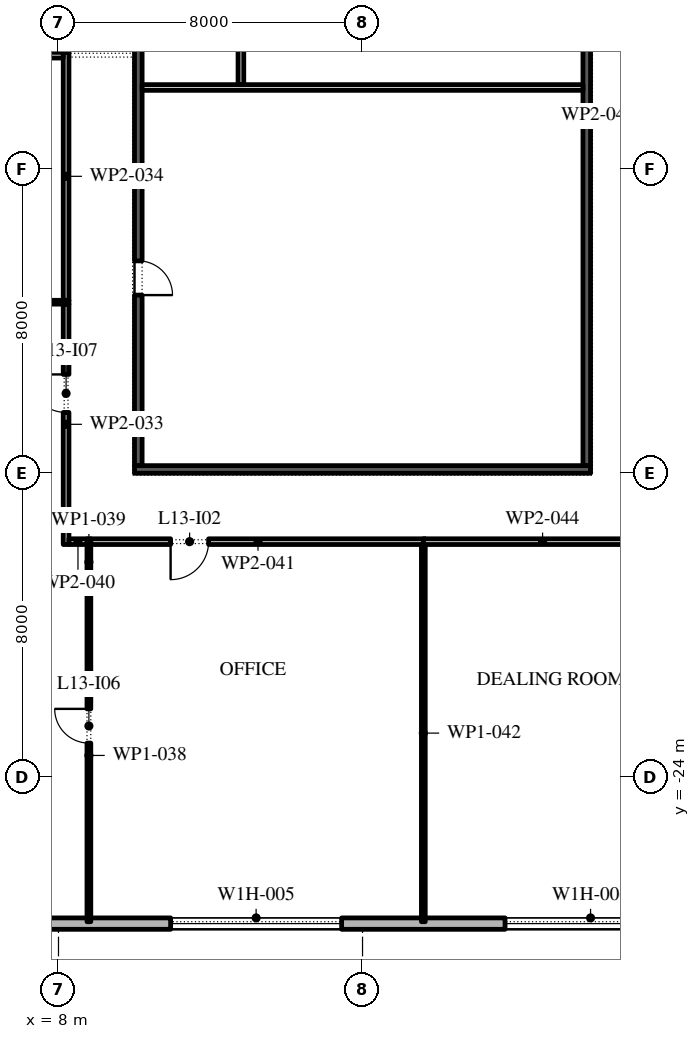
"""IFC4 building model, lengths in metres.
Left out: names, types, materials, properties, quantities, classifications, styles, units other than length and angle.
Written with IfcOpenShell. Run it as: python <this file> out.ifc"""

import sys

from ifc_helpers import new_model, si_unit, direction, frame, frame_2d, origin, place, context, subcontext, project, spatial, rectangle, extrude, element, fill, save


model = new_model("IFC4")
c1 = context("Model", 3, precision=1e-05, world=origin(), true_north=direction((0.0, 1.0)))
c2 = subcontext(c1, "Body", "Model", "MODEL_VIEW")
j1 = project(units=[si_unit("LENGTHUNIT", "METRE"), si_unit("PLANEANGLEUNIT", "RADIAN")], contexts=[c1])
p1 = place(None, origin())
s1 = spatial("IfcSite", under=j1, at=p1, CompositionType="ELEMENT")
p2 = place(p1, origin())
s2 = spatial("IfcBuilding", under=s1, at=p2, CompositionType="ELEMENT")
p3 = place(p2, frame((0.0, 0.0, 64.8)))
s3 = spatial("IfcBuildingStorey", under=s2, at=p3, CompositionType="ELEMENT", Elevation=64.8)
p4 = place(p3, frame((-26.1, -27.85, 0.0), z_axis=(0.0, 0.0, 1.0), x_axis=(1.0, 0.0, 0.0)))
e1 = element("IfcWall", 1, at=p4, inside=s3, PredefinedType="STANDARD", context=c2, shape_type="SweptSolid", body=[
    extrude(rectangle(XDim=52.5, YDim=0.3, at=frame_2d((26.25, 0.0))), origin(), (0.0, 0.0, 1.0), 4.0),
])
p5 = place(p4, frame((2.0, 0.0, 0.45)))
e2 = element("IfcOpeningElement", 2, at=p5, cuts=e1, PredefinedType="OPENING", context=c2, shape_type="SweptSolid", body=[
    extrude(rectangle(XDim=4.5, YDim=2.75, at=frame_2d((2.25, 1.375))), frame((0.0, 0.16, 0.0), z_axis=(0.0, -1.0, 0.0), x_axis=(1.0, 0.0, 0.0)), (0.0, 0.0, 1.0), 0.32),
])
p6 = place(p4, frame((10.65, 0.0, 0.45)))
e3 = element("IfcOpeningElement", 3, at=p6, cuts=e1, PredefinedType="OPENING", context=c2, shape_type="SweptSolid", body=[
    extrude(rectangle(XDim=4.5, YDim=2.75, at=frame_2d((2.25, 1.375))), frame((0.0, 0.16, 0.0), z_axis=(0.0, -1.0, 0.0), x_axis=(1.0, 0.0, 0.0)), (0.0, 0.0, 1.0), 0.32),
])
p7 = place(p4, frame((20.5, 0.0, 0.0)))
e4 = element("IfcOpeningElement", 4, at=p7, cuts=e1, PredefinedType="OPENING", context=c2, shape_type="SweptSolid", body=[
    extrude(rectangle(XDim=2.4, YDim=3.5, at=frame_2d((1.2, 1.75))), frame((0.0, 0.16, 0.0), z_axis=(0.0, -1.0, 0.0), x_axis=(1.0, 0.0, 0.0)), (0.0, 0.0, 1.0), 0.32),
])
p8 = place(p4, frame((28.25, 0.0, 0.45)))
e5 = element("IfcOpeningElement", 5, at=p8, cuts=e1, PredefinedType="OPENING", context=c2, shape_type="SweptSolid", body=[
    extrude(rectangle(XDim=4.5, YDim=2.75, at=frame_2d((2.25, 1.375))), frame((0.0, 0.16, 0.0), z_axis=(0.0, -1.0, 0.0), x_axis=(1.0, 0.0, 0.0)), (0.0, 0.0, 1.0), 0.32),
])
p9 = place(p4, frame((37.05, 0.0, 0.45)))
e6 = element("IfcOpeningElement", 6, at=p9, cuts=e1, PredefinedType="OPENING", context=c2, shape_type="SweptSolid", body=[
    extrude(rectangle(XDim=4.5, YDim=2.75, at=frame_2d((2.25, 1.375))), frame((0.0, 0.16, 0.0), z_axis=(0.0, -1.0, 0.0), x_axis=(1.0, 0.0, 0.0)), (0.0, 0.0, 1.0), 0.32),
])
p10 = place(p4, frame((45.85, 0.0, 0.45)))
e7 = element("IfcOpeningElement", 7, at=p10, cuts=e1, PredefinedType="OPENING", context=c2, shape_type="SweptSolid", body=[
    extrude(rectangle(XDim=4.5, YDim=2.75, at=frame_2d((2.25, 1.375))), frame((0.0, 0.16, 0.0), z_axis=(0.0, -1.0, 0.0), x_axis=(1.0, 0.0, 0.0)), (0.0, 0.0, 1.0), 0.32),
])
p11 = place(p3, frame((21.9, -15.8, 0.0), z_axis=(0.0, 0.0, 1.0), x_axis=(0.0, 1.0, 0.0)))
e8 = element("IfcWall", 8, at=p11, inside=s3, PredefinedType="SHEAR", context=c2, shape_type="SweptSolid", body=[
    extrude(rectangle(XDim=13.05, YDim=0.2, at=frame_2d((6.525, 0.0))), origin(), (0.0, 0.0, 1.0), 4.0),
])
p12 = place(p11, frame((11.087, 0.0, 0.0)))
e9 = element("IfcOpeningElement", 9, at=p12, cuts=e8, PredefinedType="OPENING", context=c2, shape_type="SweptSolid", body=[
    extrude(rectangle(XDim=0.9, YDim=2.1, at=frame_2d((0.45, 1.05))), frame((0.0, 0.11, 0.0), z_axis=(0.0, -1.0, 0.0), x_axis=(1.0, 0.0, 0.0)), (0.0, 0.0, 1.0), 0.22),
])
p13 = place(p3, frame((10.1, -15.8, 0.0), z_axis=(0.0, 0.0, 1.0), x_axis=(0.0, 1.0, 0.0)))
e10 = element("IfcWall", 10, at=p13, inside=s3, PredefinedType="SHEAR", context=c2, shape_type="SweptSolid", body=[
    extrude(rectangle(XDim=13.05, YDim=0.2, at=frame_2d((6.525, 0.0))), origin(), (0.0, 0.0, 1.0), 4.0),
])
p14 = place(p13, frame((4.488, 0.0, 0.0)))
e11 = element("IfcOpeningElement", 11, at=p14, cuts=e10, PredefinedType="OPENING", context=c2, shape_type="SweptSolid", body=[
    extrude(rectangle(XDim=0.9, YDim=2.1, at=frame_2d((0.45, 1.05))), frame((0.0, 0.11, 0.0), z_axis=(0.0, -1.0, 0.0), x_axis=(1.0, 0.0, 0.0)), (0.0, 0.0, 1.0), 0.22),
])
p15 = place(p13, frame((11.038, 0.0, 0.0)))
e12 = element("IfcOpeningElement", 12, at=p15, cuts=e10, PredefinedType="OPENING", context=c2, shape_type="SweptSolid", body=[
    extrude(rectangle(XDim=1.0, YDim=2.1, at=frame_2d((0.5, 1.05))), frame((0.0, 0.11, 0.0), z_axis=(0.0, -1.0, 0.0), x_axis=(1.0, 0.0, 0.0)), (0.0, 0.0, 1.0), 0.22),
])
p16 = place(p3, frame((10.0, -15.9, 0.0), z_axis=(0.0, 0.0, 1.0), x_axis=(1.0, 0.0, 0.0)))
e13 = element("IfcWall", 13, at=p16, inside=s3, PredefinedType="SHEAR", context=c2, shape_type="SweptSolid", body=[
    extrude(rectangle(XDim=12.0, YDim=0.2, at=frame_2d((6.0, 0.0))), origin(), (0.0, 0.0, 1.0), 4.0),
])
p17 = place(p3, frame((10.2, -5.85, 0.0), z_axis=(0.0, 0.0, 1.0), x_axis=(1.0, 0.0, 0.0)))
e14 = element("IfcWall", 14, at=p17, inside=s3, PredefinedType="PARTITIONING", context=c2, shape_type="SweptSolid", body=[
    extrude(rectangle(XDim=11.6, YDim=0.15, at=frame_2d((5.8, 0.0))), origin(), (0.0, 0.0, 1.0), 4.0),
])
p18 = place(p3, frame((12.8, -5.775, 0.0), z_axis=(0.0, 0.0, 1.0), x_axis=(0.0, 1.0, 0.0)))
e15 = element("IfcWall", 15, at=p18, inside=s3, PredefinedType="PARTITIONING", context=c2, shape_type="SweptSolid", body=[
    extrude(rectangle(XDim=3.025, YDim=0.15, at=frame_2d((1.512, 0.0))), origin(), (0.0, 0.0, 1.0), 4.0),
])
p19 = place(p3, frame((1.0, -19.0, 0.0), z_axis=(0.0, 0.0, 1.0), x_axis=(1.0, 0.0, 0.0)))
e16 = element("IfcWall", 16, at=p19, inside=s3, PredefinedType="PARTITIONING", context=c2, shape_type="SweptSolid", body=[
    extrude(rectangle(XDim=7.85, YDim=0.1, at=frame_2d((3.925, 0.0))), origin(), (0.0, 0.0, 1.0), 4.0),
])
p20 = place(p3, frame((1.05, -11.5, 0.0), z_axis=(0.0, 0.0, 1.0), x_axis=(1.0, 0.0, 0.0)))
e17 = element("IfcWall", 17, at=p20, inside=s3, PredefinedType="PARTITIONING", context=c2, shape_type="SweptSolid", body=[
    extrude(rectangle(XDim=7.225, YDim=0.1, at=frame_2d((3.612, 0.0))), origin(), (0.0, 0.0, 1.0), 4.0),
])
p21 = place(p3, frame((8.2, -17.875, 0.0), z_axis=(0.0, 0.0, 1.0), x_axis=(0.0, 1.0, 0.0)))
e18 = element("IfcWall", 18, at=p21, inside=s3, PredefinedType="PARTITIONING", context=c2, shape_type="SweptSolid", body=[
    extrude(rectangle(XDim=6.325, YDim=0.15, at=frame_2d((3.163, 0.0))), origin(), (0.0, 0.0, 1.0), 4.0),
])
p22 = place(p21, frame((3.475, 0.0, 0.0)))
e19 = element("IfcOpeningElement", 19, at=p22, cuts=e18, PredefinedType="OPENING", context=c2, shape_type="SweptSolid", body=[
    extrude(rectangle(XDim=1.0, YDim=2.1, at=frame_2d((0.5, 1.05))), frame((0.0, 0.085, 0.0), z_axis=(0.0, -1.0, 0.0), x_axis=(1.0, 0.0, 0.0)), (0.0, 0.0, 1.0), 0.17),
])
p23 = place(p3, frame((8.2, -11.45, 0.0), z_axis=(0.0, 0.0, 1.0), x_axis=(0.0, 1.0, 0.0)))
e20 = element("IfcWall", 20, at=p23, inside=s3, PredefinedType="PARTITIONING", context=c2, shape_type="SweptSolid", body=[
    extrude(rectangle(XDim=6.525, YDim=0.15, at=frame_2d((3.262, 0.0))), origin(), (0.0, 0.0, 1.0), 4.0),
])
p24 = place(p3, frame((8.125, -5.0, 0.0), z_axis=(0.0, 0.0, 1.0), x_axis=(-1.0, 0.0, 0.0)))
e21 = element("IfcWall", 21, at=p24, inside=s3, PredefinedType="PARTITIONING", context=c2, shape_type="SweptSolid", body=[
    extrude(rectangle(XDim=7.075, YDim=0.15, at=frame_2d((3.538, 0.0))), origin(), (0.0, 0.0, 1.0), 4.0),
])
p25 = place(p24, frame((2.975, 0.0, 0.0)))
e22 = element("IfcOpeningElement", 22, at=p25, cuts=e21, PredefinedType="OPENING", context=c2, shape_type="SweptSolid", body=[
    extrude(rectangle(XDim=1.0, YDim=2.1, at=frame_2d((0.5, 1.05))), frame((0.0, 0.085, 0.0), z_axis=(0.0, -1.0, 0.0), x_axis=(1.0, 0.0, 0.0)), (0.0, 0.0, 1.0), 0.17),
])
p26 = place(p3, frame((8.8, -27.8, 0.0), z_axis=(0.0, 0.0, 1.0), x_axis=(0.0, 1.0, 0.0)))
e23 = element("IfcWall", 23, at=p26, inside=s3, PredefinedType="PARTITIONING", context=c2, shape_type="SweptSolid", body=[
    extrude(rectangle(XDim=8.75, YDim=0.1, at=frame_2d((4.375, 0.0))), origin(), (0.0, 0.0, 1.0), 4.0),
])
p27 = place(p26, frame((4.7, 0.0, 0.0)))
e24 = element("IfcOpeningElement", 24, at=p27, cuts=e23, PredefinedType="OPENING", context=c2, shape_type="SweptSolid", body=[
    extrude(rectangle(XDim=0.9, YDim=2.1, at=frame_2d((0.45, 1.05))), frame((0.0, 0.06, 0.0), z_axis=(0.0, -1.0, 0.0), x_axis=(1.0, 0.0, 0.0)), (0.0, 0.0, 1.0), 0.12),
])
p28 = place(p3, frame((8.8, -18.95, 0.0), z_axis=(0.0, 0.0, 1.0), x_axis=(0.0, 1.0, 0.0)))
e25 = element("IfcWall", 25, at=p28, inside=s3, PredefinedType="PARTITIONING", context=c2, shape_type="SweptSolid", body=[
    extrude(rectangle(XDim=1.225, YDim=0.1, at=frame_2d((0.612, 0.0))), origin(), (0.0, 0.0, 1.0), 4.0),
])
p29 = place(p3, frame((8.75, -17.8, 0.0), z_axis=(0.0, 0.0, 1.0), x_axis=(-1.0, 0.0, 0.0)))
e26 = element("IfcWall", 26, at=p29, inside=s3, PredefinedType="PARTITIONING", context=c2, shape_type="SweptSolid", body=[
    extrude(rectangle(XDim=0.475, YDim=0.15, at=frame_2d((0.238, 0.0))), origin(), (0.0, 0.0, 1.0), 4.0),
])
p30 = place(p3, frame((17.65, -17.8, 0.0), z_axis=(0.0, 0.0, 1.0), x_axis=(-1.0, 0.0, 0.0)))
e27 = element("IfcWall", 27, at=p30, inside=s3, PredefinedType="PARTITIONING", context=c2, shape_type="SweptSolid", body=[
    extrude(rectangle(XDim=8.8, YDim=0.15, at=frame_2d((4.4, 0.0))), origin(), (0.0, 0.0, 1.0), 4.0),
])
p31 = place(p30, frame((5.7, 0.0, 0.0)))
e28 = element("IfcOpeningElement", 28, at=p31, cuts=e27, PredefinedType="OPENING", context=c2, shape_type="SweptSolid", body=[
    extrude(rectangle(XDim=1.0, YDim=2.1, at=frame_2d((0.5, 1.05))), frame((0.0, 0.085, 0.0), z_axis=(0.0, -1.0, 0.0), x_axis=(1.0, 0.0, 0.0)), (0.0, 0.0, 1.0), 0.17),
])
p32 = place(p3, frame((17.6, -17.875, 0.0), z_axis=(0.0, 0.0, 1.0), x_axis=(0.0, -1.0, 0.0)))
e29 = element("IfcWall", 29, at=p32, inside=s3, PredefinedType="PARTITIONING", context=c2, shape_type="SweptSolid", body=[
    extrude(rectangle(XDim=9.925, YDim=0.1, at=frame_2d((4.962, 0.0))), origin(), (0.0, 0.0, 1.0), 4.0),
])
p33 = place(p3, frame((23.875, -17.8, 0.0), z_axis=(0.0, 0.0, 1.0), x_axis=(-1.0, 0.0, 0.0)))
e30 = element("IfcWall", 30, at=p33, inside=s3, PredefinedType="PARTITIONING", context=c2, shape_type="SweptSolid", body=[
    extrude(rectangle(XDim=6.275, YDim=0.15, at=frame_2d((3.137, 0.0))), origin(), (0.0, 0.0, 1.0), 4.0),
])
p34 = place(p9, origin())
e31 = element("IfcWindow", 31, at=p34, inside=s3, PartitioningType="DOUBLE_PANEL_VERTICAL", PredefinedType="WINDOW", context=c2, shape_type="SweptSolid", body=[
    extrude(rectangle(XDim=4.5, YDim=2.75, at=frame_2d((2.25, 1.375))), frame((0.0, 0.03, 0.0), z_axis=(0.0, -1.0, 0.0), x_axis=(1.0, 0.0, 0.0)), (0.0, 0.0, 1.0), 0.06),
])
fill(e6, e31)
p35 = place(p10, origin())
e32 = element("IfcWindow", 32, at=p35, inside=s3, PartitioningType="DOUBLE_PANEL_VERTICAL", PredefinedType="WINDOW", context=c2, shape_type="SweptSolid", body=[
    extrude(rectangle(XDim=4.5, YDim=2.75, at=frame_2d((2.25, 1.375))), frame((0.0, 0.03, 0.0), z_axis=(0.0, -1.0, 0.0), x_axis=(1.0, 0.0, 0.0)), (0.0, 0.0, 1.0), 0.06),
])
fill(e7, e32)
p36 = place(p14, frame((0.9, -0.15, 0.0), z_axis=(0.0, 0.0, 1.0), x_axis=(-1.0, 0.0, 0.0)))
e33 = element("IfcDoor", 33, at=p36, inside=s3, OperationType="SINGLE_SWING_LEFT", PredefinedType="DOOR", context=c2, shape_type="SweptSolid", body=[
    extrude(rectangle(XDim=0.9, YDim=2.1, at=frame_2d((0.45, 1.05))), frame((0.0, -0.05, 0.0), z_axis=(0.0, -1.0, 0.0), x_axis=(1.0, 0.0, 0.0)), (0.0, 0.0, 1.0), 0.05),
])
fill(e11, e33)
p37 = place(p31, origin())
e34 = element("IfcDoor", 34, at=p37, inside=s3, OperationType="SINGLE_SWING_LEFT", PredefinedType="DOOR", context=c2, shape_type="SweptSolid", body=[
    extrude(rectangle(XDim=1.0, YDim=2.1, at=frame_2d((0.5, 1.05))), frame((0.0, 0.025, 0.0), z_axis=(0.0, -1.0, 0.0), x_axis=(1.0, 0.0, 0.0)), (0.0, 0.0, 1.0), 0.05),
])
fill(e28, e34)
p38 = place(p27, origin())
e35 = element("IfcDoor", 35, at=p38, inside=s3, OperationType="SINGLE_SWING_LEFT", PredefinedType="DOOR", context=c2, shape_type="SweptSolid", body=[
    extrude(rectangle(XDim=0.9, YDim=2.1, at=frame_2d((0.45, 1.05))), frame((0.0, 0.025, 0.0), z_axis=(0.0, -1.0, 0.0), x_axis=(1.0, 0.0, 0.0)), (0.0, 0.0, 1.0), 0.05),
])
fill(e24, e35)
p39 = place(p22, origin())
e36 = element("IfcDoor", 36, at=p39, inside=s3, OperationType="SINGLE_SWING_LEFT", PredefinedType="DOOR", context=c2, shape_type="SweptSolid", body=[
    extrude(rectangle(XDim=1.0, YDim=2.1, at=frame_2d((0.5, 1.05))), frame((0.0, 0.025, 0.0), z_axis=(0.0, -1.0, 0.0), x_axis=(1.0, 0.0, 0.0)), (0.0, 0.0, 1.0), 0.05),
])
fill(e19, e36)
save(model, sys.argv[1])
